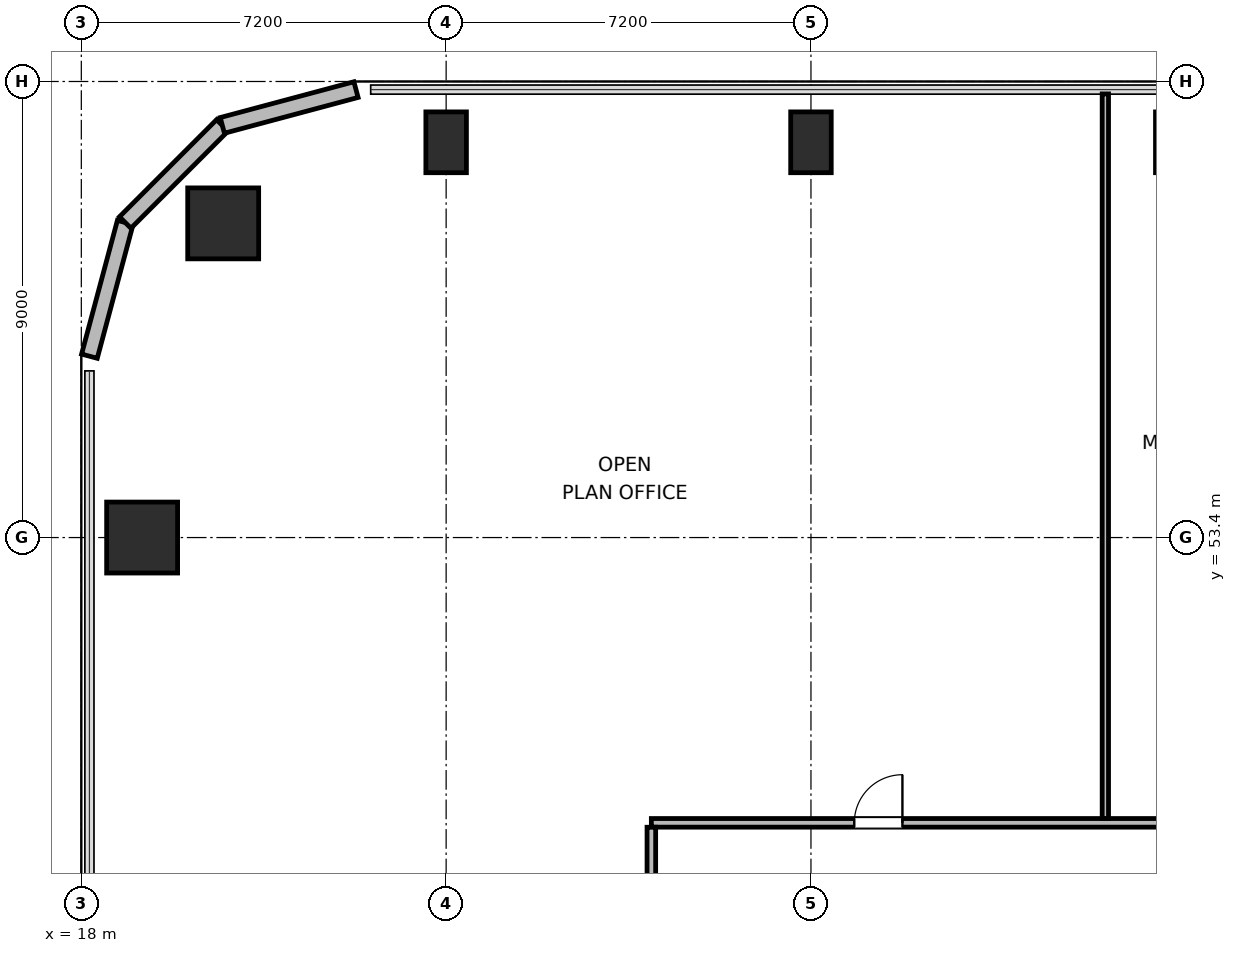
"""IFC4 building model, lengths in metres.
Left out: names, types, materials, properties, quantities, classifications, styles, units other than length and angle.
Written with IfcOpenShell. Run it as: python <this file> out.ifc"""

import sys

from ifc_helpers import new_model, si_unit, direction, frame, frame_2d, origin, origin_2d, place, context, subcontext, project, spatial, rectangle, circle, extrude, element, fill, save


model = new_model("IFC4")
c1 = context("Model", 3, precision=1e-05, world=origin(), true_north=direction((0.0, 1.0)))
c2 = subcontext(c1, "Body", "Model", "MODEL_VIEW")
j1 = project(units=[si_unit("LENGTHUNIT", "METRE"), si_unit("PLANEANGLEUNIT", "RADIAN")], contexts=[c1])
p1 = place(None, origin())
s1 = spatial("IfcSite", under=j1, at=p1, CompositionType="ELEMENT")
p2 = place(p1, origin())
s2 = spatial("IfcBuilding", under=s1, at=p2, CompositionType="ELEMENT")
p3 = place(p2, frame((0.0, 0.0, 93.6)))
s3 = spatial("IfcBuildingStorey", under=s2, at=p3, CompositionType="ELEMENT", Elevation=93.6)
p4 = place(p3, frame((20.8, 59.6, 0.0), z_axis=(0.0, 0.0, 1.0), x_axis=(1.0, 0.0, 0.0)))
e1 = element("IfcColumn", 1, at=p4, inside=s3, PredefinedType="COLUMN", context=c2, shape_type="SweptSolid", body=[
    extrude(circle(Radius=0.7, at=origin_2d()), origin(), (0.0, 0.0, 1.0), 3.9),
])
for number, where, z_axis, x_axis in (
    (2, (25.2, 61.2, 0.0), (0.0, 0.0, 1.0), (1.0, 0.0, 0.0)),
    (3, (32.4, 61.2, 0.0), (0.0, 0.0, 1.0), (1.0, 0.0, 0.0)),
    (4, (39.6, 61.2, 0.0), (0.0, 0.0, 1.0), (1.0, 0.0, 0.0)),
):
    element("IfcColumn", number, at=place(p3, frame(where, z_axis=z_axis, x_axis=x_axis)), inside=s3, PredefinedType="COLUMN", context=c2, shape_type="SweptSolid", body=[
        extrude(rectangle(XDim=0.8, YDim=1.2, at=origin_2d()), origin(), (0.0, 0.0, 1.0), 3.9),
    ])
p5 = place(p3, frame((19.2, 53.4, 0.0), z_axis=(0.0, 0.0, 1.0), x_axis=(1.0, 0.0, 0.0)))
e5 = element("IfcColumn", 5, at=p5, inside=s3, PredefinedType="COLUMN", context=c2, shape_type="SweptSolid", body=[
    extrude(rectangle(XDim=1.4, YDim=1.4, at=origin_2d()), origin(), (0.0, 0.0, 1.0), 3.9),
])
p6 = place(p3, frame((18.16, 56.979, 0.0), z_axis=(0.0, 0.0, 1.0), x_axis=(0.25869736047, 0.965958423373, 0.0)))
e6 = element("IfcWall", 6, at=p6, inside=s3, PredefinedType="SOLIDWALL", context=c2, shape_type="SweptSolid", body=[
    extrude(rectangle(XDim=2.731, YDim=0.32, at=frame_2d((1.366, 0.0))), origin(), (0.0, 0.0, 1.0), 3.64),
])
p7 = place(p3, frame((18.866, 59.617, 0.0), z_axis=(0.0, 0.0, 1.0), x_axis=(0.707106781187, 0.707106781187, 0.0)))
e7 = element("IfcWall", 7, at=p7, inside=s3, PredefinedType="SOLIDWALL", context=c2, shape_type="SweptSolid", body=[
    extrude(rectangle(XDim=2.71, YDim=0.32, at=frame_2d((1.355, 0.0))), origin(), (0.0, 0.0, 1.0), 3.64),
])
p8 = place(p3, frame((20.783, 61.533, 0.0), z_axis=(0.0, 0.0, 1.0), x_axis=(0.965964405026, 0.25867502435, 0.0)))
e8 = element("IfcWall", 8, at=p8, inside=s3, PredefinedType="SOLIDWALL", context=c2, shape_type="SweptSolid", body=[
    extrude(rectangle(XDim=2.731, YDim=0.32, at=frame_2d((1.366, 0.0))), origin(), (0.0, 0.0, 1.0), 3.64),
])
p9 = place(p3, frame((29.25, 47.77, 0.0), z_axis=(0.0, 0.0, 1.0), x_axis=(1.0, 0.0, 0.0)))
e9 = element("IfcWall", 9, at=p9, inside=s3, PredefinedType="PARTITIONING", context=c2, shape_type="SweptSolid", body=[
    extrude(rectangle(XDim=37.5, YDim=0.17, at=frame_2d((18.75, 0.0))), origin(), (0.0, 0.0, 1.0), 3.64),
])
p10 = place(p9, frame((4.005, 0.0, 0.0)))
e10 = element("IfcOpeningElement", 10, at=p10, cuts=e9, PredefinedType="OPENING", context=c2, shape_type="SweptSolid", body=[
    extrude(rectangle(XDim=0.95, YDim=2.04, at=frame_2d((0.475, 1.02))), frame((0.0, 0.095, 0.0), z_axis=(0.0, -1.0, 0.0), x_axis=(1.0, 0.0, 0.0)), (0.0, 0.0, 1.0), 0.19),
])
p11 = place(p9, frame((10.07, 0.0, 0.0)))
e11 = element("IfcOpeningElement", 11, at=p11, cuts=e9, PredefinedType="OPENING", context=c2, shape_type="SweptSolid", body=[
    extrude(rectangle(XDim=0.95, YDim=2.04, at=frame_2d((0.475, 1.02))), frame((0.0, 0.095, 0.0), z_axis=(0.0, -1.0, 0.0), x_axis=(1.0, 0.0, 0.0)), (0.0, 0.0, 1.0), 0.19),
])
p12 = place(p9, frame((17.165, 0.0, 0.0)))
e12 = element("IfcOpeningElement", 12, at=p12, cuts=e9, PredefinedType="OPENING", context=c2, shape_type="SweptSolid", body=[
    extrude(rectangle(XDim=0.95, YDim=2.04, at=frame_2d((0.475, 1.02))), frame((0.0, 0.095, 0.0), z_axis=(0.0, -1.0, 0.0), x_axis=(1.0, 0.0, 0.0)), (0.0, 0.0, 1.0), 0.19),
])
p13 = place(p9, frame((25.37, 0.0, 0.0)))
e13 = element("IfcOpeningElement", 13, at=p13, cuts=e9, PredefinedType="OPENING", context=c2, shape_type="SweptSolid", body=[
    extrude(rectangle(XDim=0.95, YDim=2.04, at=frame_2d((0.475, 1.02))), frame((0.0, 0.095, 0.0), z_axis=(0.0, -1.0, 0.0), x_axis=(1.0, 0.0, 0.0)), (0.0, 0.0, 1.0), 0.19),
])
p14 = place(p9, frame((32.545, 0.0, 0.0)))
e14 = element("IfcOpeningElement", 14, at=p14, cuts=e9, PredefinedType="OPENING", context=c2, shape_type="SweptSolid", body=[
    extrude(rectangle(XDim=0.95, YDim=2.04, at=frame_2d((0.475, 1.02))), frame((0.0, 0.095, 0.0), z_axis=(0.0, -1.0, 0.0), x_axis=(1.0, 0.0, 0.0)), (0.0, 0.0, 1.0), 0.19),
])
p15 = place(p3, frame((29.25, 24.317, 0.0), z_axis=(0.0, 0.0, 1.0), x_axis=(0.0, 1.0, 0.0)))
e15 = element("IfcWall", 15, at=p15, inside=s3, PredefinedType="PARTITIONING", context=c2, shape_type="SweptSolid", body=[
    extrude(rectangle(XDim=23.366, YDim=0.17, at=frame_2d((11.683, 0.0))), origin(), (0.0, 0.0, 1.0), 3.64),
])
p16 = place(p15, frame((4.023, 0.0, 0.0)))
e16 = element("IfcOpeningElement", 16, at=p16, cuts=e15, PredefinedType="OPENING", context=c2, shape_type="SweptSolid", body=[
    extrude(rectangle(XDim=0.95, YDim=2.04, at=frame_2d((0.475, 1.02))), frame((0.0, 0.095, 0.0), z_axis=(0.0, -1.0, 0.0), x_axis=(1.0, 0.0, 0.0)), (0.0, 0.0, 1.0), 0.19),
])
p17 = place(p15, frame((11.808, 0.0, 0.0)))
e17 = element("IfcOpeningElement", 17, at=p17, cuts=e15, PredefinedType="OPENING", context=c2, shape_type="SweptSolid", body=[
    extrude(rectangle(XDim=0.95, YDim=2.04, at=frame_2d((0.475, 1.02))), frame((0.0, 0.095, 0.0), z_axis=(0.0, -1.0, 0.0), x_axis=(1.0, 0.0, 0.0)), (0.0, 0.0, 1.0), 0.19),
])
p18 = place(p15, frame((18.993, 0.0, 0.0)))
e18 = element("IfcOpeningElement", 18, at=p18, cuts=e15, PredefinedType="OPENING", context=c2, shape_type="SweptSolid", body=[
    extrude(rectangle(XDim=0.95, YDim=2.04, at=frame_2d((0.475, 1.02))), frame((0.0, 0.095, 0.0), z_axis=(0.0, -1.0, 0.0), x_axis=(1.0, 0.0, 0.0)), (0.0, 0.0, 1.0), 0.19),
])
p19 = place(p3, frame((38.21, 47.857, 0.0), z_axis=(0.0, 0.0, 1.0), x_axis=(0.0, 1.0, 0.0)))
e19 = element("IfcWall", 19, at=p19, inside=s3, PredefinedType="PARTITIONING", context=c2, shape_type="SweptSolid", body=[
    extrude(rectangle(XDim=14.298, YDim=0.125, at=frame_2d((7.149, 0.0))), origin(), (0.0, 0.0, 1.0), 3.64),
])
p20 = place(p10, origin())
e20 = element("IfcDoor", 20, at=p20, inside=s3, OperationType="SINGLE_SWING_RIGHT", PredefinedType="DOOR", context=c2, shape_type="SweptSolid", body=[
    extrude(rectangle(XDim=0.95, YDim=2.04, at=frame_2d((0.475, 1.02))), frame((0.0, 0.025, 0.0), z_axis=(0.0, -1.0, 0.0), x_axis=(1.0, 0.0, 0.0)), (0.0, 0.0, 1.0), 0.05),
])
fill(e10, e20)
save(model, sys.argv[1])
